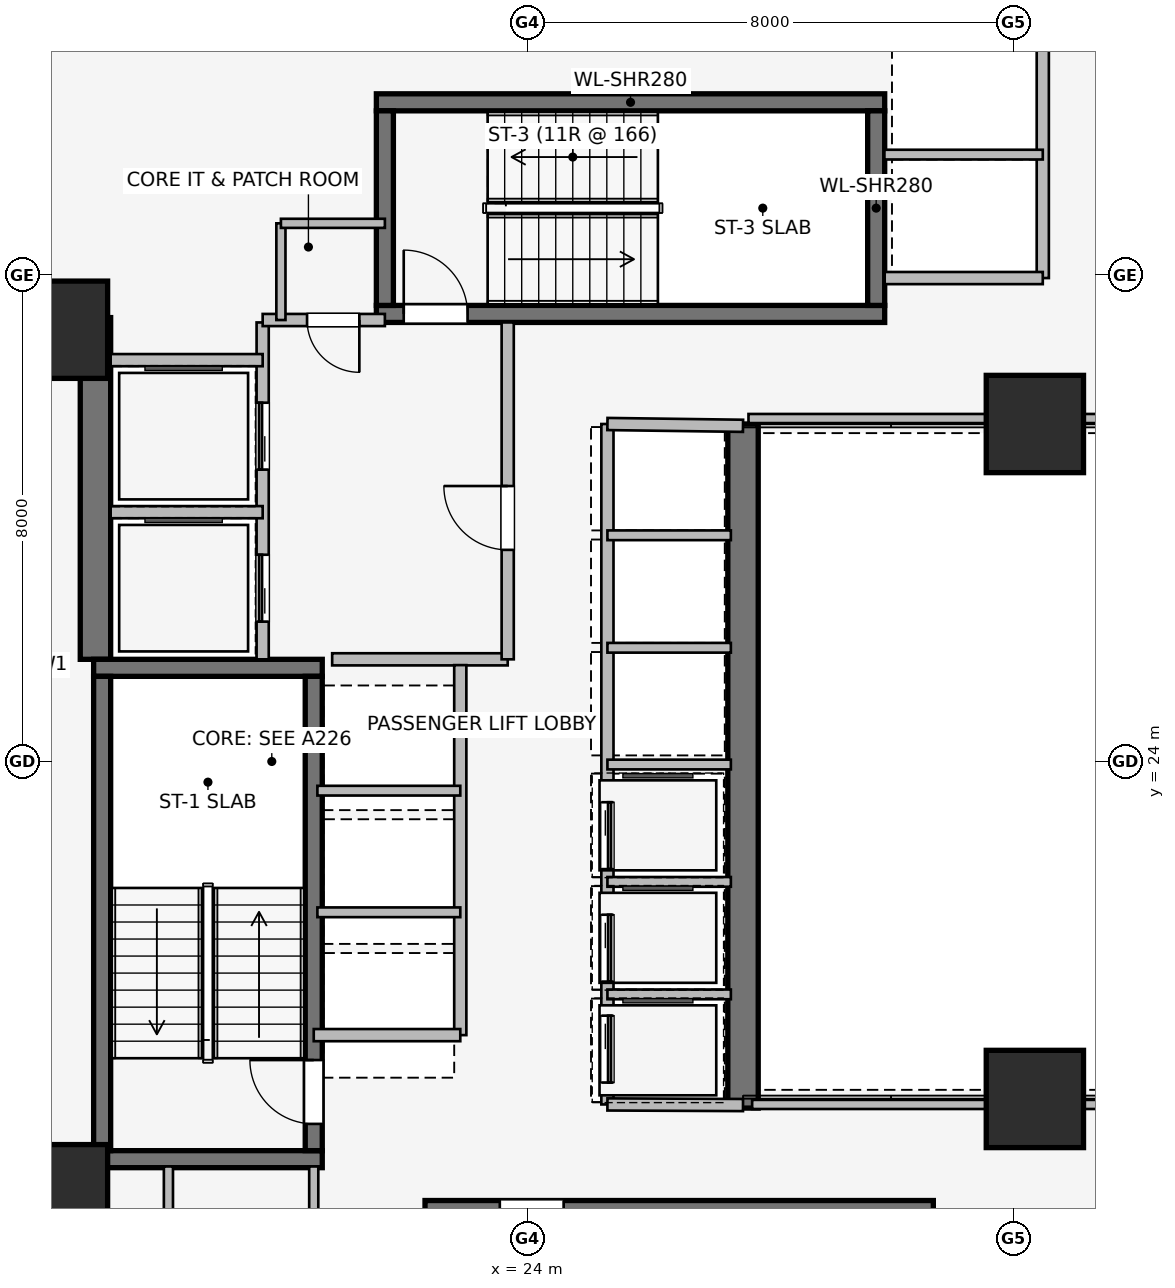
"""IFC4 building model, lengths in metres.
Left out: names, types, materials, properties, quantities, classifications, styles, units other than length and angle.
Written with IfcOpenShell. Run it as: python <this file> out.ifc"""

import sys

from ifc_helpers import new_model, si_unit, direction, frame, frame_2d, origin, origin_2d, place, context, subcontext, project, spatial, rectangle, extrude, element, fill, save


model = new_model("IFC4")
c1 = context("Model", 3, precision=1e-05, world=origin(), true_north=direction((0.0, 1.0)))
c2 = subcontext(c1, "Body", "Model", "MODEL_VIEW")
j1 = project(units=[si_unit("LENGTHUNIT", "METRE"), si_unit("PLANEANGLEUNIT", "RADIAN")], contexts=[c1])
p1 = place(None, origin())
s1 = spatial("IfcSite", under=j1, at=p1, CompositionType="ELEMENT")
p2 = place(p1, origin())
s2 = spatial("IfcBuilding", under=s1, at=p2, CompositionType="ELEMENT")
p3 = place(p2, frame((0.0, 0.0, 92.7)))
s3 = spatial("IfcBuildingStorey", under=s2, at=p3, CompositionType="ELEMENT", Elevation=92.7)
p4 = place(p3, frame((16.9, 25.68, 0.0), z_axis=(0.0, 0.0, 1.0), x_axis=(0.0, 1.0, 0.0)))
e1 = element("IfcWall", 1, at=p4, inside=s3, PredefinedType="SHEAR", context=c2, shape_type="SweptSolid", body=[
    extrude(rectangle(XDim=5.62, YDim=0.5, at=frame_2d((2.81, 0.0))), origin(), (0.0, 0.0, 1.0), 3.65),
])
p5 = place(p3, frame((27.55, 29.55, 0.0), z_axis=(0.0, 0.0, 1.0), x_axis=(0.0, -1.0, 0.0)))
e2 = element("IfcWall", 2, at=p5, inside=s3, PredefinedType="SHEAR", context=c2, shape_type="SweptSolid", body=[
    extrude(rectangle(XDim=11.25, YDim=0.5, at=frame_2d((5.625, 0.0))), origin(), (0.0, 0.0, 1.0), 3.65),
])
for number, where, z_axis, x_axis in (
    (3, (16.87, 17.46, 0.0), (0.0, 0.0, 1.0), (1.0, 0.0, 0.0)),
    (4, (20.63, 25.54, 0.0), (0.0, 0.0, 1.0), (-1.0, 0.0, 0.0)),
):
    element("IfcWall", number, at=place(p3, frame(where, z_axis=z_axis, x_axis=x_axis)), inside=s3, PredefinedType="SHEAR", context=c2, shape_type="SweptSolid", body=[
        extrude(rectangle(XDim=3.76, YDim=0.28, at=frame_2d((1.88, 0.0))), origin(), (0.0, 0.0, 1.0), 3.65),
    ])
p6 = place(p3, frame((17.01, 25.4, 0.0), z_axis=(0.0, 0.0, 1.0), x_axis=(0.0, -1.0, 0.0)))
e5 = element("IfcWall", 5, at=p6, inside=s3, PredefinedType="SHEAR", context=c2, shape_type="SweptSolid", body=[
    extrude(rectangle(XDim=7.8, YDim=0.28, at=frame_2d((3.9, 0.0))), origin(), (0.0, 0.0, 1.0), 3.65),
])
p7 = place(p3, frame((20.49, 17.6, 0.0), z_axis=(0.0, 0.0, 1.0), x_axis=(0.0, 1.0, 0.0)))
e6 = element("IfcWall", 6, at=p7, inside=s3, PredefinedType="SHEAR", context=c2, shape_type="SweptSolid", body=[
    extrude(rectangle(XDim=7.8, YDim=0.28, at=frame_2d((3.9, 0.0))), origin(), (0.0, 0.0, 1.0), 3.65),
])
p8 = place(p7, frame((0.44, 0.0, 0.0)))
e7 = element("IfcOpeningElement", 7, at=p8, cuts=e6, PredefinedType="OPENING", context=c2, shape_type="SweptSolid", body=[
    extrude(rectangle(XDim=1.05, YDim=2.0, at=frame_2d((0.525, 1.0))), frame((0.0, 0.15, 0.0), z_axis=(0.0, -1.0, 0.0), x_axis=(1.0, 0.0, 0.0)), (0.0, 0.0, 1.0), 0.3),
])
p9 = place(p3, frame((30.68, 16.64, 0.0), z_axis=(0.0, 0.0, 1.0), x_axis=(-1.0, 0.0, 0.0)))
e8 = element("IfcWall", 8, at=p9, inside=s3, PredefinedType="SHEAR", context=c2, shape_type="SweptSolid", body=[
    extrude(rectangle(XDim=8.36, YDim=0.28, at=frame_2d((4.18, 0.0))), origin(), (0.0, 0.0, 1.0), 3.65),
])
p10 = place(p9, frame((6.08, 0.0, 0.0)))
e9 = element("IfcOpeningElement", 9, at=p10, cuts=e8, PredefinedType="OPENING", context=c2, shape_type="SweptSolid", body=[
    extrude(rectangle(XDim=1.05, YDim=2.0, at=frame_2d((0.525, 1.0))), frame((0.0, 0.15, 0.0), z_axis=(0.0, -1.0, 0.0), x_axis=(1.0, 0.0, 0.0)), (0.0, 0.0, 1.0), 0.3),
])
p11 = place(p3, frame((21.52, 31.36, 0.0), z_axis=(0.0, 0.0, 1.0), x_axis=(1.0, 0.0, 0.0)))
e10 = element("IfcWall", 10, at=p11, inside=s3, PredefinedType="SHEAR", context=c2, shape_type="SweptSolid", body=[
    extrude(rectangle(XDim=8.36, YDim=0.28, at=frame_2d((4.18, 0.0))), origin(), (0.0, 0.0, 1.0), 3.65),
])
p12 = place(p11, frame((0.45, 0.0, 0.0)))
e11 = element("IfcOpeningElement", 11, at=p12, cuts=e10, PredefinedType="OPENING", context=c2, shape_type="SweptSolid", body=[
    extrude(rectangle(XDim=1.05, YDim=2.0, at=frame_2d((0.525, 1.0))), frame((0.0, 0.15, 0.0), z_axis=(0.0, -1.0, 0.0), x_axis=(1.0, 0.0, 0.0)), (0.0, 0.0, 1.0), 0.3),
])
p13 = place(p3, frame((29.88, 34.84, 0.0), z_axis=(0.0, 0.0, 1.0), x_axis=(-1.0, 0.0, 0.0)))
e12 = element("IfcWall", 12, at=p13, inside=s3, PredefinedType="SHEAR", context=c2, shape_type="SweptSolid", body=[
    extrude(rectangle(XDim=8.36, YDim=0.28, at=frame_2d((4.18, 0.0))), origin(), (0.0, 0.0, 1.0), 3.65),
])
for number, where, z_axis, x_axis in (
    (13, (21.66, 34.7, 0.0), (0.0, 0.0, 1.0), (0.0, -1.0, 0.0)),
    (14, (29.74, 31.5, 0.0), (0.0, 0.0, 1.0), (0.0, 1.0, 0.0)),
):
    element("IfcWall", number, at=place(p3, frame(where, z_axis=z_axis, x_axis=x_axis)), inside=s3, PredefinedType="SHEAR", context=c2, shape_type="SweptSolid", body=[
        extrude(rectangle(XDim=3.2, YDim=0.28, at=frame_2d((1.6, 0.0))), origin(), (0.0, 0.0, 1.0), 3.65),
    ])
for number, where, z_axis, x_axis in (
    (15, (16.3, 16.9, 0.0), (0.0, 0.0, 1.0), (1.0, 0.0, 0.0)),
    (16, (16.3, 31.1, 0.0), (0.0, 0.0, 1.0), (1.0, 0.0, 0.0)),
    (17, (32.35, 18.45, 0.0), (0.0, 0.0, 1.0), (1.0, 0.0, 0.0)),
    (18, (32.35, 29.55, 0.0), (0.0, 0.0, 1.0), (1.0, 0.0, 0.0)),
):
    element("IfcColumn", number, at=place(p3, frame(where, z_axis=z_axis, x_axis=x_axis)), inside=s3, PredefinedType="COLUMN", context=c2, shape_type="SweptSolid", body=[
        extrude(rectangle(XDim=1.6, YDim=1.6, at=origin_2d()), origin(), (0.0, 0.0, 1.0), 3.65),
    ])
p14 = place(p3, frame((19.65, 25.68, 0.0), z_axis=(0.0, 0.0, 1.0), x_axis=(0.0, 1.0, 0.0)))
e19 = element("IfcWall", 19, at=p14, inside=s3, PredefinedType="PARTITIONING", context=c2, shape_type="SweptSolid", body=[
    extrude(rectangle(XDim=5.54, YDim=0.2, at=frame_2d((2.77, 0.0))), origin(), (0.0, 0.0, 1.0), 3.34),
])
p15 = place(p14, frame((0.62, 0.0, 0.0)))
e20 = element("IfcOpeningElement", 20, at=p15, cuts=e19, PredefinedType="OPENING", context=c2, shape_type="SweptSolid", body=[
    extrude(rectangle(XDim=1.1, YDim=2.2, at=frame_2d((0.55, 1.1))), frame((0.0, 0.11, 0.0), z_axis=(0.0, -1.0, 0.0), x_axis=(1.0, 0.0, 0.0)), (0.0, 0.0, 1.0), 0.22),
])
p16 = place(p14, frame((3.12, 0.0, 0.0)))
e21 = element("IfcOpeningElement", 21, at=p16, cuts=e19, PredefinedType="OPENING", context=c2, shape_type="SweptSolid", body=[
    extrude(rectangle(XDim=1.1, YDim=2.2, at=frame_2d((0.55, 1.1))), frame((0.0, 0.11, 0.0), z_axis=(0.0, -1.0, 0.0), x_axis=(1.0, 0.0, 0.0)), (0.0, 0.0, 1.0), 0.22),
])
p17 = place(p3, frame((20.793, 25.68, 0.0), z_axis=(0.0, 0.0, 1.0), x_axis=(1.0, 0.0, 0.0)))
e22 = element("IfcWall", 22, at=p17, inside=s3, PredefinedType="PARTITIONING", context=c2, shape_type="SweptSolid", body=[
    extrude(rectangle(XDim=2.887, YDim=0.2, at=frame_2d((1.443, 0.0))), origin(), (0.0, 0.0, 1.0), 3.34),
])
p18 = place(p3, frame((23.68, 25.68, 0.0), z_axis=(0.0, 0.0, 1.0), x_axis=(0.0, 1.0, 0.0)))
e23 = element("IfcWall", 23, at=p18, inside=s3, PredefinedType="PARTITIONING", context=c2, shape_type="SweptSolid", body=[
    extrude(rectangle(XDim=5.54, YDim=0.2, at=frame_2d((2.77, 0.0))), origin(), (0.0, 0.0, 1.0), 3.34),
])
p19 = place(p18, frame((1.8, 0.0, 0.0)))
e24 = element("IfcOpeningElement", 24, at=p19, cuts=e23, PredefinedType="OPENING", context=c2, shape_type="SweptSolid", body=[
    extrude(rectangle(XDim=1.05, YDim=2.0, at=frame_2d((0.525, 1.0))), frame((0.0, 0.11, 0.0), z_axis=(0.0, -1.0, 0.0), x_axis=(1.0, 0.0, 0.0)), (0.0, 0.0, 1.0), 0.22),
])
p20 = place(p3, frame((21.66, 31.26, 0.0), z_axis=(0.0, 0.0, 1.0), x_axis=(-1.0, 0.0, 0.0)))
e25 = element("IfcWall", 25, at=p20, inside=s3, PredefinedType="PARTITIONING", context=c2, shape_type="SweptSolid", body=[
    extrude(rectangle(XDim=2.01, YDim=0.2, at=frame_2d((1.005, 0.0))), origin(), (0.0, 0.0, 1.0), 3.34),
])
p21 = place(p20, frame((0.42, 0.0, 0.0)))
e26 = element("IfcOpeningElement", 26, at=p21, cuts=e25, PredefinedType="OPENING", context=c2, shape_type="SweptSolid", body=[
    extrude(rectangle(XDim=0.86, YDim=2.0, at=frame_2d((0.43, 1.0))), frame((0.0, 0.11, 0.0), z_axis=(0.0, -1.0, 0.0), x_axis=(1.0, 0.0, 0.0)), (0.0, 0.0, 1.0), 0.22),
])
p22 = place(p3, frame((17.15, 28.1, 0.0), z_axis=(0.0, 0.0, 1.0), x_axis=(1.0, 0.0, 0.0)))
e27 = element("IfcWall", 27, at=p22, inside=s3, PredefinedType="PARTITIONING", context=c2, shape_type="SweptSolid", body=[
    extrude(rectangle(XDim=2.5, YDim=0.2, at=frame_2d((1.25, 0.0))), origin(), (0.0, 0.0, 1.0), 3.34),
])
p23 = place(p3, frame((19.65, 30.6, 0.0), z_axis=(0.0, 0.0, 1.0), x_axis=(-1.0, 0.0, 0.0)))
e28 = element("IfcWall", 28, at=p23, inside=s3, PredefinedType="PARTITIONING", context=c2, shape_type="SweptSolid", body=[
    extrude(rectangle(XDim=2.5, YDim=0.2, at=frame_2d((1.25, 0.0))), origin(), (0.0, 0.0, 1.0), 2.24),
])
p24 = place(p3, frame((32.48, 31.95, 0.0), z_axis=(0.0, 0.0, 1.0), x_axis=(0.0, 1.0, 0.0)))
e29 = element("IfcWall", 29, at=p24, inside=s3, PredefinedType="PARTITIONING", context=c2, shape_type="SweptSolid", body=[
    extrude(rectangle(XDim=4.05, YDim=0.2, at=frame_2d((2.025, 0.0))), origin(), (0.0, 0.0, 1.0), 2.463),
])
p25 = place(p3, frame((32.48, 31.95, 0.0), z_axis=(0.0, 0.0, 1.0), x_axis=(-1.0, 0.0, 0.0)))
e30 = element("IfcWall", 30, at=p25, inside=s3, PredefinedType="PARTITIONING", context=c2, shape_type="SweptSolid", body=[
    extrude(rectangle(XDim=2.6, YDim=0.2, at=frame_2d((1.3, 0.0))), origin(), (0.0, 0.0, 1.0), 3.34),
])
p26 = place(p3, frame((29.875, 33.98, 0.0), z_axis=(0.0, 0.0, 1.0), x_axis=(1.0, 0.0, 0.0)))
e31 = element("IfcWall", 31, at=p26, inside=s3, PredefinedType="PARTITIONING", context=c2, shape_type="SweptSolid", body=[
    extrude(rectangle(XDim=2.605, YDim=0.16, at=frame_2d((1.302, 0.0))), origin(), (0.0, 0.0, 1.0), 3.34),
])
p27 = place(p3, frame((22.9, 19.5, 0.0), z_axis=(0.0, 0.0, 1.0), x_axis=(0.0, 1.0, 0.0)))
e32 = element("IfcWall", 32, at=p27, inside=s3, PredefinedType="PARTITIONING", context=c2, shape_type="SweptSolid", body=[
    extrude(rectangle(XDim=6.085, YDim=0.2, at=frame_2d((3.042, 0.0))), origin(), (0.0, 0.0, 1.0), 3.34),
])
p28 = place(p3, frame((20.49, 19.5, 0.0), z_axis=(0.0, 0.0, 1.0), x_axis=(1.0, 0.0, 0.0)))
e33 = element("IfcWall", 33, at=p28, inside=s3, PredefinedType="PARTITIONING", context=c2, shape_type="SweptSolid", body=[
    extrude(rectangle(XDim=2.41, YDim=0.2, at=frame_2d((1.205, 0.0))), origin(), (0.0, 0.0, 1.0), 2.24),
])
for number, where, z_axis, x_axis in (
    (34, (20.55, 21.52, 0.0), (0.0, 0.0, 1.0), (1.0, 0.0, 0.0)),
    (35, (20.55, 23.52, 0.0), (0.0, 0.0, 1.0), (1.0, 0.0, 0.0)),
):
    element("IfcWall", number, at=place(p3, frame(where, z_axis=z_axis, x_axis=x_axis)), inside=s3, PredefinedType="PARTITIONING", context=c2, shape_type="SweptSolid", body=[
        extrude(rectangle(XDim=2.35, YDim=0.16, at=frame_2d((1.175, 0.0))), origin(), (0.0, 0.0, 1.0), 3.34),
    ])
p29 = place(p3, frame((25.32, 29.55, 0.0), z_axis=(0.0, 0.0, 1.0), x_axis=(0.0, -1.0, 0.0)))
e36 = element("IfcWall", 36, at=p29, inside=s3, PredefinedType="PARTITIONING", context=c2, shape_type="SweptSolid", body=[
    extrude(rectangle(XDim=11.19, YDim=0.2, at=frame_2d((5.595, 0.0))), origin(), (0.0, 0.0, 1.0), 3.34),
])
p30 = place(p29, frame((6.22, 0.0, 0.0)))
e37 = element("IfcOpeningElement", 37, at=p30, cuts=e36, PredefinedType="OPENING", context=c2, shape_type="SweptSolid", body=[
    extrude(rectangle(XDim=1.1, YDim=2.2, at=frame_2d((0.55, 1.1))), frame((0.0, 0.11, 0.0), z_axis=(0.0, -1.0, 0.0), x_axis=(1.0, 0.0, 0.0)), (0.0, 0.0, 1.0), 0.22),
])
p31 = place(p29, frame((8.07, 0.0, 0.0)))
e38 = element("IfcOpeningElement", 38, at=p31, cuts=e36, PredefinedType="OPENING", context=c2, shape_type="SweptSolid", body=[
    extrude(rectangle(XDim=1.1, YDim=2.2, at=frame_2d((0.55, 1.1))), frame((0.0, 0.11, 0.0), z_axis=(0.0, -1.0, 0.0), x_axis=(1.0, 0.0, 0.0)), (0.0, 0.0, 1.0), 0.22),
])
p32 = place(p29, frame((9.73, 0.0, 0.0)))
e39 = element("IfcOpeningElement", 39, at=p32, cuts=e36, PredefinedType="OPENING", context=c2, shape_type="SweptSolid", body=[
    extrude(rectangle(XDim=1.1, YDim=2.2, at=frame_2d((0.55, 1.1))), frame((0.0, 0.11, 0.0), z_axis=(0.0, -1.0, 0.0), x_axis=(1.0, 0.0, 0.0)), (0.0, 0.0, 1.0), 0.22),
])
p33 = place(p3, frame((25.32, 18.36, 0.0), z_axis=(0.0, 0.0, 1.0), x_axis=(0.999989925833, -0.004488678231, 0.0)))
e40 = element("IfcWall", 40, at=p33, inside=s3, PredefinedType="PARTITIONING", context=c2, shape_type="SweptSolid", body=[
    extrude(rectangle(XDim=2.23, YDim=0.2, at=frame_2d((1.115, 0.0))), origin(), (0.0, 0.0, 1.0), 3.34),
])
p34 = place(p3, frame((27.55, 29.52, 0.0), z_axis=(0.0, 0.0, 1.0), x_axis=(-0.999909343457, 0.013464949556, 0.0)))
e41 = element("IfcWall", 41, at=p34, inside=s3, PredefinedType="PARTITIONING", context=c2, shape_type="SweptSolid", body=[
    extrude(rectangle(XDim=2.23, YDim=0.2, at=frame_2d((1.115, 0.0))), origin(), (0.0, 0.0, 1.0), 2.24),
])
for number, where, z_axis, x_axis in (
    (42, (25.32, 20.17, 0.0), (0.0, 0.0, 1.0), (1.0, 0.0, 0.0)),
    (43, (25.32, 22.02, 0.0), (0.0, 0.0, 1.0), (1.0, 0.0, 0.0)),
    (44, (25.32, 23.95, 0.0), (0.0, 0.0, 1.0), (1.0, 0.0, 0.0)),
    (45, (25.32, 25.87, 0.0), (0.0, 0.0, 1.0), (1.0, 0.0, 0.0)),
    (46, (25.32, 27.72, 0.0), (0.0, 0.0, 1.0), (1.0, 0.0, 0.0)),
):
    element("IfcWall", number, at=place(p3, frame(where, z_axis=z_axis, x_axis=x_axis)), inside=s3, PredefinedType="PARTITIONING", context=c2, shape_type="SweptSolid", body=[
        extrude(rectangle(XDim=2.03, YDim=0.16, at=frame_2d((1.015, 0.0))), origin(), (0.0, 0.0, 1.0), 3.34),
    ])
p35 = place(p3, frame((18.1, 17.34, 0.0), z_axis=(0.0, 0.0, 1.0), x_axis=(0.0, -1.0, 0.0)))
e47 = element("IfcWall", 47, at=p35, inside=s3, PredefinedType="PARTITIONING", context=c2, shape_type="SweptSolid", body=[
    extrude(rectangle(XDim=4.14, YDim=0.15, at=frame_2d((2.07, 0.0))), origin(), (0.0, 0.0, 1.0), 3.34),
])
p36 = place(p3, frame((20.49, 13.2, 0.0), z_axis=(0.0, 0.0, 1.0), x_axis=(0.0, 1.0, 0.0)))
e48 = element("IfcWall", 48, at=p36, inside=s3, PredefinedType="PARTITIONING", context=c2, shape_type="SweptSolid", body=[
    extrude(rectangle(XDim=4.14, YDim=0.15, at=frame_2d((2.07, 0.0))), origin(), (0.0, 0.0, 1.0), 3.34),
])
p37 = place(p36, frame((1.25, 0.0, 0.0)))
e49 = element("IfcOpeningElement", 49, at=p37, cuts=e48, PredefinedType="OPENING", context=c2, shape_type="SweptSolid", body=[
    extrude(rectangle(XDim=0.9, YDim=2.0, at=frame_2d((0.45, 1.0))), frame((0.0, 0.085, 0.0), z_axis=(0.0, -1.0, 0.0), x_axis=(1.0, 0.0, 0.0)), (0.0, 0.0, 1.0), 0.17),
])
p38 = place(p3, frame((19.95, 32.85, 0.0), z_axis=(0.0, 0.0, 1.0), x_axis=(0.0, -1.0, 0.0)))
e50 = element("IfcWall", 50, at=p38, inside=s3, PredefinedType="PARTITIONING", context=c2, shape_type="SweptSolid", body=[
    extrude(rectangle(XDim=1.59, YDim=0.15, at=frame_2d((0.795, 0.0))), origin(), (0.0, 0.0, 1.0), 3.34),
])
p39 = place(p3, frame((21.66, 32.85, 0.0), z_axis=(0.0, 0.0, 1.0), x_axis=(-1.0, 0.0, 0.0)))
e51 = element("IfcWall", 51, at=p39, inside=s3, PredefinedType="PARTITIONING", context=c2, shape_type="SweptSolid", body=[
    extrude(rectangle(XDim=1.71, YDim=0.15, at=frame_2d((0.855, 0.0))), origin(), (0.0, 0.0, 1.0), 3.34),
])
p40 = place(p3, frame((27.7, 18.36, 0.0), z_axis=(0.0, 0.0, 1.0), x_axis=(1.0, 0.0, 0.0)))
e52 = element("IfcWall", 52, at=p40, inside=s3, PredefinedType="PARTITIONING", context=c2, shape_type="SweptSolid", body=[
    extrude(rectangle(XDim=12.14, YDim=0.15, at=frame_2d((6.07, 0.0))), origin(), (0.0, 0.0, 1.0), 2.481),
])
p41 = place(p3, frame((39.84, 29.64, 0.0), z_axis=(0.0, 0.0, 1.0), x_axis=(-1.0, 0.0, 0.0)))
e53 = element("IfcWall", 53, at=p41, inside=s3, PredefinedType="PARTITIONING", context=c2, shape_type="SweptSolid", body=[
    extrude(rectangle(XDim=12.2, YDim=0.15, at=frame_2d((6.1, 0.0))), origin(), (0.0, 0.0, 1.0), 2.481),
])
p42 = place(p8, origin())
e54 = element("IfcDoor", 54, at=p42, inside=s3, OperationType="SINGLE_SWING_RIGHT", PredefinedType="DOOR", context=c2, shape_type="SweptSolid", body=[
    extrude(rectangle(XDim=1.05, YDim=2.0, at=frame_2d((0.525, 1.0))), frame((0.0, 0.025, 0.0), z_axis=(0.0, -1.0, 0.0), x_axis=(1.0, 0.0, 0.0)), (0.0, 0.0, 1.0), 0.05),
])
fill(e7, e54)
p43 = place(p10, origin())
e55 = element("IfcDoor", 55, at=p43, inside=s3, OperationType="SINGLE_SWING_RIGHT", PredefinedType="DOOR", context=c2, shape_type="SweptSolid", body=[
    extrude(rectangle(XDim=1.05, YDim=2.0, at=frame_2d((0.525, 1.0))), frame((0.0, 0.025, 0.0), z_axis=(0.0, -1.0, 0.0), x_axis=(1.0, 0.0, 0.0)), (0.0, 0.0, 1.0), 0.05),
])
fill(e9, e55)
p44 = place(p12, origin())
e56 = element("IfcDoor", 56, at=p44, inside=s3, OperationType="SINGLE_SWING_LEFT", PredefinedType="DOOR", context=c2, shape_type="SweptSolid", body=[
    extrude(rectangle(XDim=1.05, YDim=2.0, at=frame_2d((0.525, 1.0))), frame((0.0, 0.025, 0.0), z_axis=(0.0, -1.0, 0.0), x_axis=(1.0, 0.0, 0.0)), (0.0, 0.0, 1.0), 0.05),
])
fill(e11, e56)
p45 = place(p15, origin())
e57 = element("IfcDoor", 57, at=p45, inside=s3, OperationType="SLIDING_TO_LEFT", PredefinedType="DOOR", context=c2, shape_type="SweptSolid", body=[
    extrude(rectangle(XDim=1.1, YDim=2.2, at=frame_2d((0.55, 1.1))), frame((0.0, 0.025, 0.0), z_axis=(0.0, -1.0, 0.0), x_axis=(1.0, 0.0, 0.0)), (0.0, 0.0, 1.0), 0.05),
])
fill(e20, e57)
p46 = place(p16, origin())
e58 = element("IfcDoor", 58, at=p46, inside=s3, OperationType="SLIDING_TO_LEFT", PredefinedType="DOOR", context=c2, shape_type="SweptSolid", body=[
    extrude(rectangle(XDim=1.1, YDim=2.2, at=frame_2d((0.55, 1.1))), frame((0.0, 0.025, 0.0), z_axis=(0.0, -1.0, 0.0), x_axis=(1.0, 0.0, 0.0)), (0.0, 0.0, 1.0), 0.05),
])
fill(e21, e58)
p47 = place(p19, origin())
e59 = element("IfcDoor", 59, at=p47, inside=s3, OperationType="SINGLE_SWING_RIGHT", PredefinedType="DOOR", context=c2, shape_type="SweptSolid", body=[
    extrude(rectangle(XDim=1.05, YDim=2.0, at=frame_2d((0.525, 1.0))), frame((0.0, 0.025, 0.0), z_axis=(0.0, -1.0, 0.0), x_axis=(1.0, 0.0, 0.0)), (0.0, 0.0, 1.0), 0.05),
])
fill(e24, e59)
p48 = place(p21, origin())
e60 = element("IfcDoor", 60, at=p48, inside=s3, OperationType="SINGLE_SWING_LEFT", PredefinedType="DOOR", context=c2, shape_type="SweptSolid", body=[
    extrude(rectangle(XDim=0.86, YDim=2.0, at=frame_2d((0.43, 1.0))), frame((0.0, 0.025, 0.0), z_axis=(0.0, -1.0, 0.0), x_axis=(1.0, 0.0, 0.0)), (0.0, 0.0, 1.0), 0.05),
])
fill(e26, e60)
p49 = place(p30, origin())
e61 = element("IfcDoor", 61, at=p49, inside=s3, OperationType="SLIDING_TO_LEFT", PredefinedType="DOOR", context=c2, shape_type="SweptSolid", body=[
    extrude(rectangle(XDim=1.1, YDim=2.2, at=frame_2d((0.55, 1.1))), frame((0.0, 0.025, 0.0), z_axis=(0.0, -1.0, 0.0), x_axis=(1.0, 0.0, 0.0)), (0.0, 0.0, 1.0), 0.05),
])
fill(e37, e61)
p50 = place(p31, origin())
e62 = element("IfcDoor", 62, at=p50, inside=s3, OperationType="SLIDING_TO_LEFT", PredefinedType="DOOR", context=c2, shape_type="SweptSolid", body=[
    extrude(rectangle(XDim=1.1, YDim=2.2, at=frame_2d((0.55, 1.1))), frame((0.0, 0.025, 0.0), z_axis=(0.0, -1.0, 0.0), x_axis=(1.0, 0.0, 0.0)), (0.0, 0.0, 1.0), 0.05),
])
fill(e38, e62)
p51 = place(p32, origin())
e63 = element("IfcDoor", 63, at=p51, inside=s3, OperationType="SLIDING_TO_LEFT", PredefinedType="DOOR", context=c2, shape_type="SweptSolid", body=[
    extrude(rectangle(XDim=1.1, YDim=2.2, at=frame_2d((0.55, 1.1))), frame((0.0, 0.025, 0.0), z_axis=(0.0, -1.0, 0.0), x_axis=(1.0, 0.0, 0.0)), (0.0, 0.0, 1.0), 0.05),
])
fill(e39, e63)
save(model, sys.argv[1])
